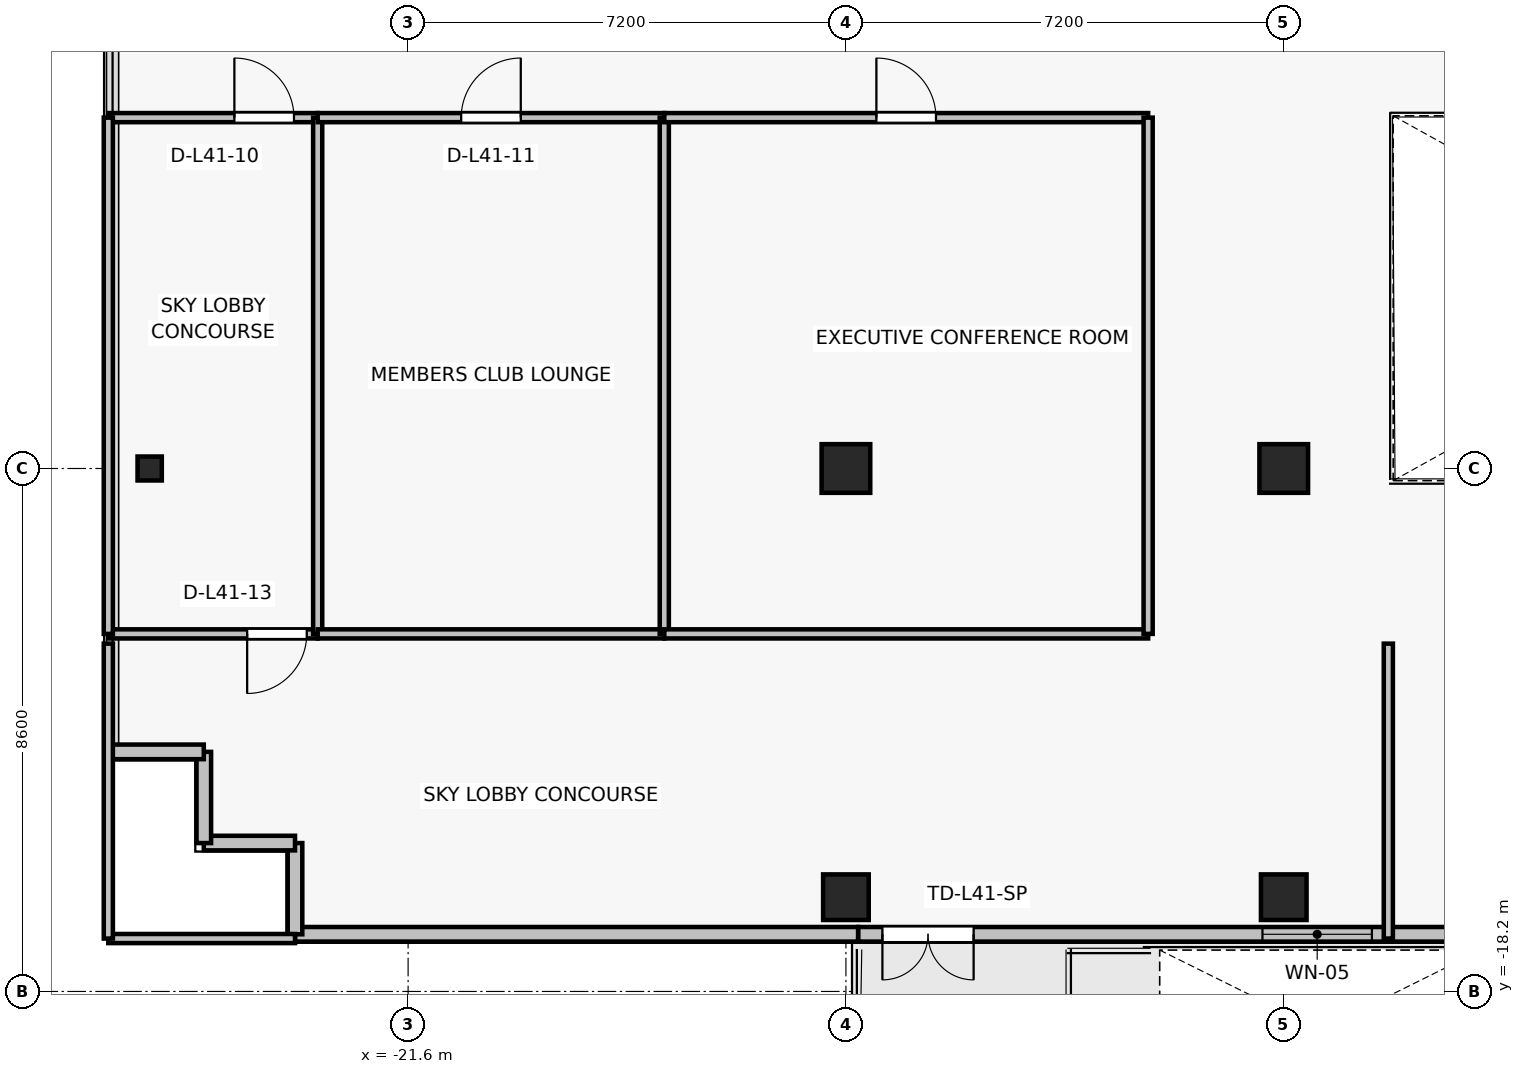
"""IFC4 building model, lengths in metres.
Left out: names, types, materials, properties, quantities, classifications, styles, units other than length and angle.
Written with IfcOpenShell. Run it as: python <this file> out.ifc"""

import sys

from ifc_helpers import new_model, si_unit, direction, frame, frame_2d, origin, origin_2d, place, context, subcontext, project, spatial, rectangle, i_section, extrude, source, transform, mapped, element, fill, save


model = new_model("IFC4")
c1 = context("Model", 3, precision=1e-05, world=origin(), true_north=direction((0.0, 1.0)))
c2 = subcontext(c1, "Body", "Model", "MODEL_VIEW")
j1 = project(units=[si_unit("LENGTHUNIT", "METRE"), si_unit("PLANEANGLEUNIT", "RADIAN")], contexts=[c1])
p1 = place(None, origin())
s1 = spatial("IfcSite", under=j1, at=p1, CompositionType="ELEMENT")
p2 = place(p1, origin())
s2 = spatial("IfcBuilding", under=s1, at=p2, CompositionType="ELEMENT")
p3 = place(p2, frame((0.0, 0.0, 149.5)))
s3 = spatial("IfcBuildingStorey", under=s2, at=p3, CompositionType="ELEMENT", Elevation=149.5)
for number, where, z_axis, x_axis in (
    (1, (-14.4, -9.6, 0.0), (0.0, 0.0, 1.0), (1.0, 0.0, 0.0)),
    (2, (-7.2, -9.6, 0.0), (0.0, 0.0, 1.0), (1.0, 0.0, 0.0)),
):
    element("IfcColumn", number, at=place(p3, frame(where, z_axis=z_axis, x_axis=x_axis)), inside=s3, PredefinedType="COLUMN", context=c2, shape_type="SweptSolid", body=[
        extrude(rectangle(XDim=0.8, YDim=0.8, at=origin_2d()), origin(), (0.0, 0.0, 1.0), 3.3),
    ])
for number, where, z_axis, x_axis in (
    (3, (-14.4, -16.65, 0.0), (0.0, 0.0, 1.0), (1.0, 0.0, 0.0)),
    (4, (-7.2, -16.65, 0.0), (0.0, 0.0, 1.0), (1.0, 0.0, 0.0)),
):
    element("IfcColumn", number, at=place(p3, frame(where, z_axis=z_axis, x_axis=x_axis)), inside=s3, PredefinedType="COLUMN", context=c2, shape_type="SweptSolid", body=[
        extrude(rectangle(XDim=0.75, YDim=0.75, at=origin_2d()), origin(), (0.0, 0.0, 1.0), 3.3),
    ])
p4 = place(p3, frame((-25.85, -9.6, 0.0), z_axis=(0.0, 0.0, 1.0), x_axis=(1.0, 0.0, 0.0)))
e5 = element("IfcColumn", 5, at=p4, inside=s3, PredefinedType="COLUMN", context=c2, shape_type="SweptSolid", body=[
    extrude(i_section(OverallWidth=0.399, OverallDepth=0.394, WebThickness=0.023, FlangeThickness=0.037, FilletRadius=0.015, at=origin_2d()), origin(), (0.0, 0.0, 1.0), 3.3),
])
p5 = place(p3, frame((-3.2, -17.26, 0.0), z_axis=(0.0, 0.0, 1.0), x_axis=(-1.0, 0.0, 0.0)))
e6 = element("IfcWall", 6, at=p5, inside=s3, PredefinedType="SOLIDWALL", context=c2, shape_type="SweptSolid", body=[
    extrude(rectangle(XDim=11.0, YDim=0.24, at=frame_2d((5.5, 0.0))), origin(), (0.0, 0.0, 1.0), 2.665),
])
p6 = place(p5, frame((9.1, 0.0, 0.0)))
e7 = element("IfcOpeningElement", 7, at=p6, cuts=e6, PredefinedType="OPENING", context=c2, shape_type="SweptSolid", body=[
    extrude(rectangle(XDim=1.5, YDim=2.2, at=frame_2d((0.75, 1.1))), frame((0.0, 0.13, 0.0), z_axis=(0.0, -1.0, 0.0), x_axis=(1.0, 0.0, 0.0)), (0.0, 0.0, 1.0), 0.26),
])
p7 = place(p5, frame((2.55, 0.0, 0.85)))
e8 = element("IfcOpeningElement", 8, at=p7, cuts=e6, PredefinedType="OPENING", context=c2, shape_type="SweptSolid", body=[
    extrude(rectangle(XDim=1.8, YDim=1.6, at=frame_2d((0.9, 0.8))), frame((0.0, 0.13, 0.0), z_axis=(0.0, -1.0, 0.0), x_axis=(1.0, 0.0, 0.0)), (0.0, 0.0, 1.0), 0.26),
])
p8 = place(p3, frame((-23.46, -17.26, 0.0), z_axis=(0.0, 0.0, 1.0), x_axis=(1.0, 0.0, 0.0)))
e9 = element("IfcWall", 9, at=p8, inside=s3, PredefinedType="SOLIDWALL", context=c2, shape_type="SweptSolid", body=[
    extrude(rectangle(XDim=9.26, YDim=0.24, at=frame_2d((4.63, 0.0))), origin(), (0.0, 0.0, 1.0), 3.075),
])
for number, where, z_axis, x_axis in (
    (10, (-23.46, -15.76, 0.0), (0.0, 0.0, 1.0), (0.0, -1.0, 0.0)),
    (11, (-24.96, -15.76, 0.0), (0.0, 0.0, 1.0), (1.0, 0.0, 0.0)),
    (12, (-24.96, -14.26, 0.0), (0.0, 0.0, 1.0), (0.0, -1.0, 0.0)),
    (13, (-26.46, -14.26, 0.0), (0.0, 0.0, 1.0), (1.0, 0.0, 0.0)),
):
    element("IfcWall", number, at=place(p3, frame(where, z_axis=z_axis, x_axis=x_axis)), inside=s3, PredefinedType="SOLIDWALL", context=c2, shape_type="SweptSolid", body=[
        extrude(rectangle(XDim=1.5, YDim=0.24, at=frame_2d((0.75, 0.0))), origin(), (0.0, 0.0, 1.0), 3.075),
    ])
p9 = place(p3, frame((-23.087, -12.32, 0.0), z_axis=(0.0, 0.0, 1.0), x_axis=(-1.0, 0.0, 0.0)))
e14 = element("IfcWall", 14, at=p9, inside=s3, PredefinedType="PARTITIONING", context=c2, shape_type="SweptSolid", body=[
    extrude(rectangle(XDim=3.443, YDim=0.15, at=frame_2d((1.722, 0.0))), origin(), (0.0, 0.0, 1.0), 3.075),
])
p10 = place(p9, frame((0.18, 0.0, 0.0)))
e15 = element("IfcOpeningElement", 15, at=p10, cuts=e14, PredefinedType="OPENING", context=c2, shape_type="SweptSolid", body=[
    extrude(rectangle(XDim=0.98, YDim=2.15, at=frame_2d((0.49, 1.075))), frame((0.0, 0.085, 0.0), z_axis=(0.0, -1.0, 0.0), x_axis=(1.0, 0.0, 0.0)), (0.0, 0.0, 1.0), 0.17),
])
p11 = place(p3, frame((-26.53, -3.83, 0.0), z_axis=(0.0, 0.0, 1.0), x_axis=(1.0, 0.0, 0.0)))
e16 = element("IfcWall", 16, at=p11, inside=s3, PredefinedType="PARTITIONING", context=c2, shape_type="SweptSolid", body=[
    extrude(rectangle(XDim=3.443, YDim=0.15, at=frame_2d((1.722, 0.0))), origin(), (0.0, 0.0, 1.0), 2.565),
])
p12 = place(p11, frame((2.073, 0.0, 0.0)))
e17 = element("IfcOpeningElement", 17, at=p12, cuts=e16, PredefinedType="OPENING", context=c2, shape_type="SweptSolid", body=[
    extrude(rectangle(XDim=0.98, YDim=2.15, at=frame_2d((0.49, 1.075))), frame((0.0, 0.085, 0.0), z_axis=(0.0, -1.0, 0.0), x_axis=(1.0, 0.0, 0.0)), (0.0, 0.0, 1.0), 0.17),
])
p13 = place(p3, frame((-26.53, -12.32, 0.0), z_axis=(0.0, 0.0, 1.0), x_axis=(0.0, 1.0, 0.0)))
e18 = element("IfcWall", 18, at=p13, inside=s3, PredefinedType="PARTITIONING", context=c2, shape_type="SweptSolid", body=[
    extrude(rectangle(XDim=8.49, YDim=0.15, at=frame_2d((4.245, 0.0))), origin(), (0.0, 0.0, 1.0), 2.665),
])
p14 = place(p3, frame((-23.087, -3.83, 0.0), z_axis=(0.0, 0.0, 1.0), x_axis=(0.0, -1.0, 0.0)))
e19 = element("IfcWall", 19, at=p14, inside=s3, PredefinedType="PARTITIONING", context=c2, shape_type="SweptSolid", body=[
    extrude(rectangle(XDim=8.49, YDim=0.15, at=frame_2d((4.245, 0.0))), origin(), (0.0, 0.0, 1.0), 2.565),
])
p15 = place(p3, frame((-17.387, -12.32, 0.0), z_axis=(0.0, 0.0, 1.0), x_axis=(-1.0, 0.0, 0.0)))
e20 = element("IfcWall", 20, at=p15, inside=s3, PredefinedType="PARTITIONING", context=c2, shape_type="SweptSolid", body=[
    extrude(rectangle(XDim=5.7, YDim=0.15, at=frame_2d((2.85, 0.0))), origin(), (0.0, 0.0, 1.0), 3.075),
])
p16 = place(p3, frame((-23.087, -3.83, 0.0), z_axis=(0.0, 0.0, 1.0), x_axis=(1.0, 0.0, 0.0)))
e21 = element("IfcWall", 21, at=p16, inside=s3, PredefinedType="PARTITIONING", context=c2, shape_type="SweptSolid", body=[
    extrude(rectangle(XDim=5.7, YDim=0.15, at=frame_2d((2.85, 0.0))), origin(), (0.0, 0.0, 1.0), 3.075),
])
p17 = place(p16, frame((2.36, 0.0, 0.0)))
e22 = element("IfcOpeningElement", 22, at=p17, cuts=e21, PredefinedType="OPENING", context=c2, shape_type="SweptSolid", body=[
    extrude(rectangle(XDim=0.98, YDim=2.15, at=frame_2d((0.49, 1.075))), frame((0.0, 0.085, 0.0), z_axis=(0.0, -1.0, 0.0), x_axis=(1.0, 0.0, 0.0)), (0.0, 0.0, 1.0), 0.17),
])
p18 = place(p3, frame((-17.387, -3.83, 0.0), z_axis=(0.0, 0.0, 1.0), x_axis=(0.0, -1.0, 0.0)))
e23 = element("IfcWall", 23, at=p18, inside=s3, PredefinedType="PARTITIONING", context=c2, shape_type="SweptSolid", body=[
    extrude(rectangle(XDim=8.49, YDim=0.15, at=frame_2d((4.245, 0.0))), origin(), (0.0, 0.0, 1.0), 2.565),
])
p19 = place(p3, frame((-9.43, -12.32, 0.0), z_axis=(0.0, 0.0, 1.0), x_axis=(-1.0, 0.0, 0.0)))
e24 = element("IfcWall", 24, at=p19, inside=s3, PredefinedType="PARTITIONING", context=c2, shape_type="SweptSolid", body=[
    extrude(rectangle(XDim=7.957, YDim=0.15, at=frame_2d((3.979, 0.0))), origin(), (0.0, 0.0, 1.0), 2.565),
])
p20 = place(p3, frame((-17.387, -3.83, 0.0), z_axis=(0.0, 0.0, 1.0), x_axis=(1.0, 0.0, 0.0)))
e25 = element("IfcWall", 25, at=p20, inside=s3, PredefinedType="PARTITIONING", context=c2, shape_type="SweptSolid", body=[
    extrude(rectangle(XDim=7.957, YDim=0.15, at=frame_2d((3.979, 0.0))), origin(), (0.0, 0.0, 1.0), 2.565),
])
p21 = place(p20, frame((3.488, 0.0, 0.0)))
e26 = element("IfcOpeningElement", 26, at=p21, cuts=e25, PredefinedType="OPENING", context=c2, shape_type="SweptSolid", body=[
    extrude(rectangle(XDim=0.98, YDim=2.15, at=frame_2d((0.49, 1.075))), frame((0.0, 0.085, 0.0), z_axis=(0.0, -1.0, 0.0), x_axis=(1.0, 0.0, 0.0)), (0.0, 0.0, 1.0), 0.17),
])
p22 = place(p3, frame((-9.43, -3.83, 0.0), z_axis=(0.0, 0.0, 1.0), x_axis=(0.0, -1.0, 0.0)))
e27 = element("IfcWall", 27, at=p22, inside=s3, PredefinedType="PARTITIONING", context=c2, shape_type="SweptSolid", body=[
    extrude(rectangle(XDim=8.49, YDim=0.15, at=frame_2d((4.245, 0.0))), origin(), (0.0, 0.0, 1.0), 2.565),
])
p23 = place(p3, frame((-23.46, -17.33, 0.0), z_axis=(0.0, 0.0, 1.0), x_axis=(-1.0, 0.0, 0.0)))
e28 = element("IfcWall", 28, at=p23, inside=s3, PredefinedType="PARTITIONING", context=c2, shape_type="SweptSolid", body=[
    extrude(rectangle(XDim=3.07, YDim=0.15, at=frame_2d((1.535, 0.0))), origin(), (0.0, 0.0, 1.0), 2.665),
])
p24 = place(p3, frame((-26.53, -17.33, 0.0), z_axis=(0.0, 0.0, 1.0), x_axis=(0.0, 1.0, 0.0)))
e29 = element("IfcWall", 29, at=p24, inside=s3, PredefinedType="PARTITIONING", context=c2, shape_type="SweptSolid", body=[
    extrude(rectangle(XDim=4.85, YDim=0.15, at=frame_2d((2.425, 0.0))), origin(), (0.0, 0.0, 1.0), 3.075),
])
p25 = place(p3, frame((-5.48, -12.48, 0.0), z_axis=(0.0, 0.0, 1.0), x_axis=(0.0, -1.0, 0.0)))
e30 = element("IfcWall", 30, at=p25, inside=s3, PredefinedType="PARTITIONING", context=c2, shape_type="SweptSolid", body=[
    extrude(rectangle(XDim=4.85, YDim=0.15, at=frame_2d((2.425, 0.0))), origin(), (0.0, 0.0, 1.0), 2.565),
])
m1 = source(origin(), c2, "Body", "SweptSolid", [
    extrude(rectangle(XDim=1.5, YDim=2.2, at=frame_2d((0.75, 1.1))), frame((0.0, 0.025, 0.0), z_axis=(0.0, -1.0, 0.0), x_axis=(1.0, 0.0, 0.0)), (0.0, 0.0, 1.0), 0.05),
])
p26 = place(p6, origin())
e31 = element("IfcDoor", 31, at=p26, inside=s3, OperationType="DOUBLE_DOOR_SINGLE_SWING", PredefinedType="DOOR", context=c2, shape_type="MappedRepresentation", body=[
    mapped(m1, transform((0.0, 0.0, 0.0), x_axis=(1.0, 0.0, 0.0), y_axis=(0.0, 1.0, 0.0), z_axis=(0.0, 0.0, 1.0), scale=1.0)),
])
fill(e7, e31)
m2 = source(origin(), c2, "Body", "SweptSolid", [
    extrude(rectangle(XDim=1.8, YDim=1.6, at=frame_2d((0.9, 0.8))), frame((0.0, 0.03, 0.0), z_axis=(0.0, -1.0, 0.0), x_axis=(1.0, 0.0, 0.0)), (0.0, 0.0, 1.0), 0.06),
])
p27 = place(p7, origin())
e32 = element("IfcWindow", 32, at=p27, inside=s3, PartitioningType="SINGLE_PANEL", PredefinedType="WINDOW", context=c2, shape_type="MappedRepresentation", body=[
    mapped(m2, transform((0.0, 0.0, 0.0), x_axis=(1.0, 0.0, 0.0), y_axis=(0.0, 1.0, 0.0), z_axis=(0.0, 0.0, 1.0), scale=1.0)),
])
fill(e8, e32)
m3 = source(origin(), c2, "Body", "SweptSolid", [
    extrude(rectangle(XDim=0.98, YDim=2.15, at=frame_2d((0.49, 1.075))), frame((0.0, 0.025, 0.0), z_axis=(0.0, -1.0, 0.0), x_axis=(1.0, 0.0, 0.0)), (0.0, 0.0, 1.0), 0.05),
])
p28 = place(p12, origin())
e33 = element("IfcDoor", 33, at=p28, inside=s3, OperationType="SINGLE_SWING_LEFT", PredefinedType="DOOR", context=c2, shape_type="MappedRepresentation", body=[
    mapped(m3, transform((0.0, 0.0, 0.0), x_axis=(1.0, 0.0, 0.0), y_axis=(0.0, 1.0, 0.0), z_axis=(0.0, 0.0, 1.0), scale=1.0)),
])
fill(e17, e33)
p29 = place(p17, origin())
e34 = element("IfcDoor", 34, at=p29, inside=s3, OperationType="SINGLE_SWING_RIGHT", PredefinedType="DOOR", context=c2, shape_type="MappedRepresentation", body=[
    mapped(m3, transform((0.0, 0.0, 0.0), x_axis=(1.0, 0.0, 0.0), y_axis=(0.0, 1.0, 0.0), z_axis=(0.0, 0.0, 1.0), scale=1.0)),
])
fill(e22, e34)
p30 = place(p21, origin())
e35 = element("IfcDoor", 35, at=p30, inside=s3, OperationType="SINGLE_SWING_LEFT", PredefinedType="DOOR", context=c2, shape_type="MappedRepresentation", body=[
    mapped(m3, transform((0.0, 0.0, 0.0), x_axis=(1.0, 0.0, 0.0), y_axis=(0.0, 1.0, 0.0), z_axis=(0.0, 0.0, 1.0), scale=1.0)),
])
fill(e26, e35)
p31 = place(p10, origin())
e36 = element("IfcDoor", 36, at=p31, inside=s3, OperationType="SINGLE_SWING_RIGHT", PredefinedType="DOOR", context=c2, shape_type="MappedRepresentation", body=[
    mapped(m3, transform((0.0, 0.0, 0.0), x_axis=(1.0, 0.0, 0.0), y_axis=(0.0, 1.0, 0.0), z_axis=(0.0, 0.0, 1.0), scale=1.0)),
])
fill(e15, e36)
save(model, sys.argv[1])
